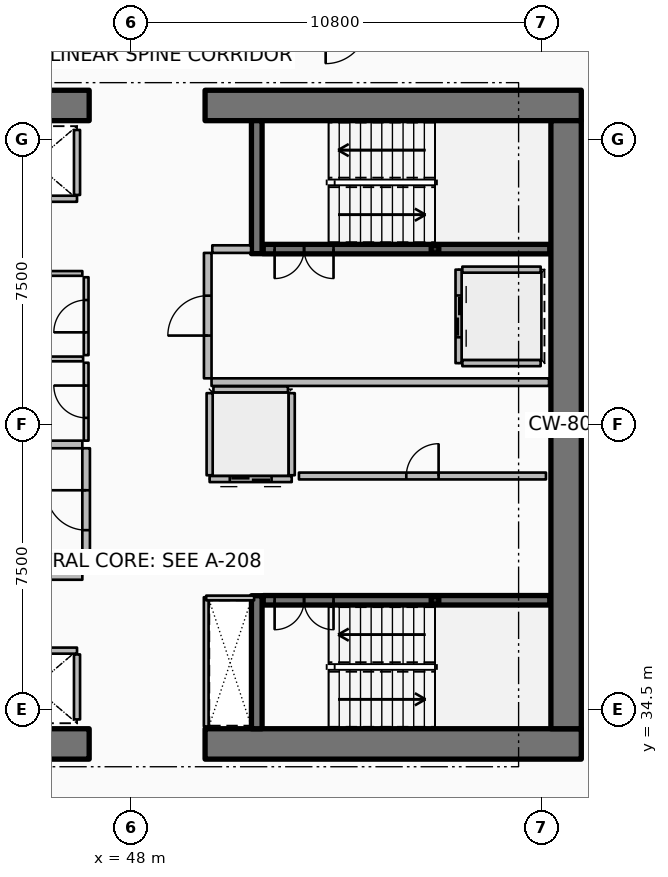
"""IFC4 building model, lengths in metres.
Left out: names, types, materials, properties, quantities, classifications, styles, units other than length and angle.
Written with IfcOpenShell. Run it as: python <this file> out.ifc"""

import sys

from ifc_helpers import new_model, si_unit, direction, frame, frame_2d, origin, origin_2d, place, context, subcontext, project, spatial, rectangle, hollow_rectangle, extrude, element, fill, save


model = new_model("IFC4")
c1 = context("Model", 3, precision=1e-05, world=origin(), true_north=direction((0.0, 1.0)))
c2 = subcontext(c1, "Body", "Model", "MODEL_VIEW")
j1 = project(units=[si_unit("LENGTHUNIT", "METRE"), si_unit("PLANEANGLEUNIT", "RADIAN")], contexts=[c1])
p1 = place(None, origin())
s1 = spatial("IfcSite", under=j1, at=p1, CompositionType="ELEMENT")
p2 = place(p1, origin())
s2 = spatial("IfcBuilding", under=s1, at=p2, CompositionType="ELEMENT")
p3 = place(p2, frame((0.0, 0.0, 165.3)))
s3 = spatial("IfcBuildingStorey", under=s2, at=p3, CompositionType="ELEMENT", Elevation=165.3)
p4 = place(p3, frame((37.0, 33.6, 0.0), z_axis=(0.0, 0.0, 1.0), x_axis=(1.0, 0.0, 0.0)))
e1 = element("IfcWall", 1, at=p4, inside=s3, PredefinedType="SHEAR", context=c2, shape_type="SweptSolid", body=[
    extrude(rectangle(XDim=9.9, YDim=0.8, at=frame_2d((4.95, 0.0))), origin(), (0.0, 0.0, 1.0), 3.75),
])
p5 = place(p3, frame((49.95, 33.6, 0.0), z_axis=(0.0, 0.0, 1.0), x_axis=(1.0, 0.0, 0.0)))
e2 = element("IfcWall", 2, at=p5, inside=s3, PredefinedType="SHEAR", context=c2, shape_type="SweptSolid", body=[
    extrude(rectangle(XDim=9.9, YDim=0.8, at=frame_2d((4.95, 0.0))), origin(), (0.0, 0.0, 1.0), 3.75),
])
p6 = place(p3, frame((37.0, 50.4, 0.0), z_axis=(0.0, 0.0, 1.0), x_axis=(1.0, 0.0, 0.0)))
e3 = element("IfcWall", 3, at=p6, inside=s3, PredefinedType="SHEAR", context=c2, shape_type="SweptSolid", body=[
    extrude(rectangle(XDim=9.9, YDim=0.8, at=frame_2d((4.95, 0.0))), origin(), (0.0, 0.0, 1.0), 3.75),
])
p7 = place(p3, frame((49.95, 50.4, 0.0), z_axis=(0.0, 0.0, 1.0), x_axis=(1.0, 0.0, 0.0)))
e4 = element("IfcWall", 4, at=p7, inside=s3, PredefinedType="SHEAR", context=c2, shape_type="SweptSolid", body=[
    extrude(rectangle(XDim=9.9, YDim=0.8, at=frame_2d((4.95, 0.0))), origin(), (0.0, 0.0, 1.0), 3.75),
])
p8 = place(p3, frame((59.45, 34.0, 0.0), z_axis=(0.0, 0.0, 1.0), x_axis=(0.0, 1.0, 0.0)))
e5 = element("IfcWall", 5, at=p8, inside=s3, PredefinedType="SHEAR", context=c2, shape_type="SweptSolid", body=[
    extrude(rectangle(XDim=16.0, YDim=0.8, at=frame_2d((8.0, 0.0))), origin(), (0.0, 0.0, 1.0), 3.75),
])
for number, where, z_axis, x_axis in (
    (6, (51.31, 46.5, 0.0), (0.0, 0.0, 1.0), (0.0, 1.0, 0.0)),
    (7, (51.31, 34.0, 0.0), (0.0, 0.0, 1.0), (0.0, 1.0, 0.0)),
):
    element("IfcWall", number, at=place(p3, frame(where, z_axis=z_axis, x_axis=x_axis)), inside=s3, PredefinedType="SHEAR", context=c2, shape_type="SweptSolid", body=[
        extrude(rectangle(XDim=3.5, YDim=0.28, at=frame_2d((1.75, 0.0))), origin(), (0.0, 0.0, 1.0), 3.75),
    ])
for number, where, z_axis, x_axis in (
    (8, (56.0, 46.62, 0.0), (0.0, 0.0, 1.0), (1.0, 0.0, 0.0)),
    (9, (56.0, 37.38, 0.0), (0.0, 0.0, 1.0), (1.0, 0.0, 0.0)),
):
    element("IfcColumn", number, at=place(p3, frame(where, z_axis=z_axis, x_axis=x_axis)), inside=s3, PredefinedType="COLUMN", context=c2, shape_type="SweptSolid", body=[
        extrude(hollow_rectangle(XDim=0.2, YDim=0.2, WallThickness=0.01, InnerFilletRadius=0.01, OuterFilletRadius=0.02, at=origin_2d()), origin(), (0.0, 0.0, 1.0), 1.67),
    ])
p9 = place(p3, frame((51.48, 46.62, 0.0), z_axis=(0.0, 0.0, 1.0), x_axis=(1.0, 0.0, 0.0)))
e10 = element("IfcWall", 10, at=p9, inside=s3, PredefinedType="SOLIDWALL", context=c2, shape_type="SweptSolid", body=[
    extrude(rectangle(XDim=7.54, YDim=0.25, at=frame_2d((3.77, 0.0))), origin(), (0.0, 0.0, 1.0), 3.5),
])
p10 = place(p9, frame((0.3, 0.0, 0.0)))
e11 = element("IfcOpeningElement", 11, at=p10, cuts=e10, PredefinedType="OPENING", context=c2, shape_type="SweptSolid", body=[
    extrude(rectangle(XDim=1.55, YDim=2.15, at=frame_2d((0.775, 1.075))), frame((0.0, 0.135, 0.0), z_axis=(0.0, -1.0, 0.0), x_axis=(1.0, 0.0, 0.0)), (0.0, 0.0, 1.0), 0.27),
])
p11 = place(p3, frame((51.48, 37.38, 0.0), z_axis=(0.0, 0.0, 1.0), x_axis=(1.0, 0.0, 0.0)))
e12 = element("IfcWall", 12, at=p11, inside=s3, PredefinedType="SOLIDWALL", context=c2, shape_type="SweptSolid", body=[
    extrude(rectangle(XDim=7.54, YDim=0.25, at=frame_2d((3.77, 0.0))), origin(), (0.0, 0.0, 1.0), 3.5),
])
p12 = place(p11, frame((0.3, 0.0, 0.0)))
e13 = element("IfcOpeningElement", 13, at=p12, cuts=e12, PredefinedType="OPENING", context=c2, shape_type="SweptSolid", body=[
    extrude(rectangle(XDim=1.55, YDim=2.15, at=frame_2d((0.775, 1.075))), frame((0.0, 0.135, 0.0), z_axis=(0.0, -1.0, 0.0), x_axis=(1.0, 0.0, 0.0)), (0.0, 0.0, 1.0), 0.27),
])
p13 = place(p3, frame((46.58, 47.945, 0.0), z_axis=(0.0, 0.0, 1.0), x_axis=(-1.0, 0.0, 0.0)))
e14 = element("IfcWall", 14, at=p13, inside=s3, PredefinedType="PARTITIONING", context=c2, shape_type="SweptSolid", body=[
    extrude(rectangle(XDim=2.26, YDim=0.16, at=frame_2d((1.13, 0.0))), origin(), (0.0, 0.0, 1.0), 3.5),
])
p14 = place(p3, frame((46.58, 48.045, 0.0), z_axis=(0.0, 0.0, 1.0), x_axis=(0.0, 1.0, 0.0)))
e15 = element("IfcWall", 15, at=p14, inside=s3, PredefinedType="PARTITIONING", context=c2, shape_type="SweptSolid", body=[
    extrude(rectangle(XDim=1.71, YDim=0.16, at=frame_2d((0.855, 0.0))), origin(), (0.0, 0.0, 1.0), 3.5),
])
p15 = place(p3, frame((44.32, 36.055, 0.0), z_axis=(0.0, 0.0, 1.0), x_axis=(1.0, 0.0, 0.0)))
e16 = element("IfcWall", 16, at=p15, inside=s3, PredefinedType="PARTITIONING", context=c2, shape_type="SweptSolid", body=[
    extrude(rectangle(XDim=2.26, YDim=0.16, at=frame_2d((1.13, 0.0))), origin(), (0.0, 0.0, 1.0), 3.5),
])
p16 = place(p3, frame((46.58, 34.245, 0.0), z_axis=(0.0, 0.0, 1.0), x_axis=(0.0, 1.0, 0.0)))
e17 = element("IfcWall", 17, at=p16, inside=s3, PredefinedType="PARTITIONING", context=c2, shape_type="SweptSolid", body=[
    extrude(rectangle(XDim=1.71, YDim=0.16, at=frame_2d((0.855, 0.0))), origin(), (0.0, 0.0, 1.0), 3.5),
])
p17 = place(p3, frame((56.62, 46.08, 0.0), z_axis=(0.0, 0.0, 1.0), x_axis=(0.0, -1.0, 0.0)))
e18 = element("IfcWall", 18, at=p17, inside=s3, PredefinedType="PARTITIONING", context=c2, shape_type="SweptSolid", body=[
    extrude(rectangle(XDim=2.46, YDim=0.16, at=frame_2d((1.23, 0.0))), origin(), (0.0, 0.0, 1.0), 3.5),
])
p18 = place(p17, frame((0.68, 0.0, 0.0)))
e19 = element("IfcOpeningElement", 19, at=p18, cuts=e18, PredefinedType="OPENING", context=c2, shape_type="SweptSolid", body=[
    extrude(rectangle(XDim=1.1, YDim=2.1, at=frame_2d((0.55, 1.05))), frame((0.0, 0.09, 0.0), z_axis=(0.0, -1.0, 0.0), x_axis=(1.0, 0.0, 0.0)), (0.0, 0.0, 1.0), 0.18),
])
for number, where, z_axis, x_axis in (
    (20, (56.72, 46.08, 0.0), (0.0, 0.0, 1.0), (1.0, 0.0, 0.0)),
    (21, (56.72, 43.62, 0.0), (0.0, 0.0, 1.0), (1.0, 0.0, 0.0)),
):
    element("IfcWall", number, at=place(p3, frame(where, z_axis=z_axis, x_axis=x_axis)), inside=s3, PredefinedType="PARTITIONING", context=c2, shape_type="SweptSolid", body=[
        extrude(rectangle(XDim=2.06, YDim=0.16, at=frame_2d((1.03, 0.0))), origin(), (0.0, 0.0, 1.0), 3.5),
    ])
p19 = place(p3, frame((52.23, 40.57, 0.0), z_axis=(0.0, 0.0, 1.0), x_axis=(-1.0, 0.0, 0.0)))
e22 = element("IfcWall", 22, at=p19, inside=s3, PredefinedType="PARTITIONING", context=c2, shape_type="SweptSolid", body=[
    extrude(rectangle(XDim=2.16, YDim=0.16, at=frame_2d((1.08, 0.0))), origin(), (0.0, 0.0, 1.0), 3.5),
])
p20 = place(p19, frame((0.53, 0.0, 0.0)))
e23 = element("IfcOpeningElement", 23, at=p20, cuts=e22, PredefinedType="OPENING", context=c2, shape_type="SweptSolid", body=[
    extrude(rectangle(XDim=1.1, YDim=2.1, at=frame_2d((0.55, 1.05))), frame((0.0, 0.09, 0.0), z_axis=(0.0, -1.0, 0.0), x_axis=(1.0, 0.0, 0.0)), (0.0, 0.0, 1.0), 0.18),
])
for number, where, z_axis, x_axis in (
    (24, (52.23, 40.67, 0.0), (0.0, 0.0, 1.0), (0.0, 1.0, 0.0)),
    (25, (50.07, 40.67, 0.0), (0.0, 0.0, 1.0), (0.0, 1.0, 0.0)),
):
    element("IfcWall", number, at=place(p3, frame(where, z_axis=z_axis, x_axis=x_axis)), inside=s3, PredefinedType="PARTITIONING", context=c2, shape_type="SweptSolid", body=[
        extrude(rectangle(XDim=2.16, YDim=0.16, at=frame_2d((1.08, 0.0))), origin(), (0.0, 0.0, 1.0), 3.5),
    ])
p21 = place(p3, frame((50.17, 42.93, 0.0), z_axis=(0.0, 0.0, 1.0), x_axis=(1.0, 0.0, 0.0)))
e26 = element("IfcWall", 26, at=p21, inside=s3, PredefinedType="PARTITIONING", context=c2, shape_type="SweptSolid", body=[
    extrude(rectangle(XDim=1.96, YDim=0.16, at=frame_2d((0.98, 0.0))), origin(), (0.0, 0.0, 1.0), 3.5),
])
p22 = place(p3, frame((52.42, 40.65, 0.0), z_axis=(0.0, 0.0, 1.0), x_axis=(1.0, 0.0, 0.0)))
e27 = element("IfcWall", 27, at=p22, inside=s3, PredefinedType="PARTITIONING", context=c2, shape_type="SweptSolid", body=[
    extrude(rectangle(XDim=6.5, YDim=0.18, at=frame_2d((3.25, 0.0))), origin(), (0.0, 0.0, 1.0), 3.5),
])
p23 = place(p22, frame((2.825, 0.0, 0.0)))
e28 = element("IfcOpeningElement", 28, at=p23, cuts=e27, PredefinedType="OPENING", context=c2, shape_type="SweptSolid", body=[
    extrude(rectangle(XDim=0.85, YDim=2.06, at=frame_2d((0.425, 1.03))), frame((0.0, 0.1, 0.0), z_axis=(0.0, -1.0, 0.0), x_axis=(1.0, 0.0, 0.0)), (0.0, 0.0, 1.0), 0.2),
])
p24 = place(p3, frame((41.35, 38.02, 0.0), z_axis=(0.0, 0.0, 1.0), x_axis=(1.0, 0.0, 0.0)))
e29 = element("IfcWall", 29, at=p24, inside=s3, PredefinedType="PARTITIONING", context=c2, shape_type="SweptSolid", body=[
    extrude(rectangle(XDim=5.37, YDim=0.2, at=frame_2d((2.685, 0.0))), origin(), (0.0, 0.0, 1.0), 3.5),
])
p25 = place(p3, frame((43.92, 41.48, 0.0), z_axis=(0.0, 0.0, 1.0), x_axis=(1.0, 0.0, 0.0)))
e30 = element("IfcWall", 30, at=p25, inside=s3, PredefinedType="PARTITIONING", context=c2, shape_type="SweptSolid", body=[
    extrude(rectangle(XDim=2.8, YDim=0.2, at=frame_2d((1.4, 0.0))), origin(), (0.0, 0.0, 1.0), 3.5),
])
p26 = place(p3, frame((46.82, 38.12, 0.0), z_axis=(0.0, 0.0, 1.0), x_axis=(0.0, 1.0, 0.0)))
e31 = element("IfcWall", 31, at=p26, inside=s3, PredefinedType="PARTITIONING", context=c2, shape_type="SweptSolid", body=[
    extrude(rectangle(XDim=3.26, YDim=0.2, at=frame_2d((1.63, 0.0))), origin(), (0.0, 0.0, 1.0), 3.5),
])
p27 = place(p26, frame((1.105, 0.0, 0.0)))
e32 = element("IfcOpeningElement", 32, at=p27, cuts=e31, PredefinedType="OPENING", context=c2, shape_type="SweptSolid", body=[
    extrude(rectangle(XDim=1.05, YDim=2.1, at=frame_2d((0.525, 1.05))), frame((0.0, 0.11, 0.0), z_axis=(0.0, -1.0, 0.0), x_axis=(1.0, 0.0, 0.0)), (0.0, 0.0, 1.0), 0.22),
])
p28 = place(p3, frame((50.12, 43.12, 0.0), z_axis=(0.0, 0.0, 1.0), x_axis=(1.0, 0.0, 0.0)))
e33 = element("IfcWall", 33, at=p28, inside=s3, PredefinedType="PARTITIONING", context=c2, shape_type="SweptSolid", body=[
    extrude(rectangle(XDim=8.88, YDim=0.2, at=frame_2d((4.44, 0.0))), origin(), (0.0, 0.0, 1.0), 3.5),
])
p29 = place(p3, frame((50.14, 46.62, 0.0), z_axis=(0.0, 0.0, 1.0), x_axis=(1.0, 0.0, 0.0)))
e34 = element("IfcWall", 34, at=p29, inside=s3, PredefinedType="PARTITIONING", context=c2, shape_type="SweptSolid", body=[
    extrude(rectangle(XDim=1.02, YDim=0.2, at=frame_2d((0.51, 0.0))), origin(), (0.0, 0.0, 1.0), 3.5),
])
p30 = place(p3, frame((50.02, 43.22, 0.0), z_axis=(0.0, 0.0, 1.0), x_axis=(0.0, 1.0, 0.0)))
e35 = element("IfcWall", 35, at=p30, inside=s3, PredefinedType="PARTITIONING", context=c2, shape_type="SweptSolid", body=[
    extrude(rectangle(XDim=3.3, YDim=0.2, at=frame_2d((1.65, 0.0))), origin(), (0.0, 0.0, 1.0), 3.5),
])
p31 = place(p30, frame((1.125, 0.0, 0.0)))
e36 = element("IfcOpeningElement", 36, at=p31, cuts=e35, PredefinedType="OPENING", context=c2, shape_type="SweptSolid", body=[
    extrude(rectangle(XDim=1.05, YDim=2.1, at=frame_2d((0.525, 1.05))), frame((0.0, 0.11, 0.0), z_axis=(0.0, -1.0, 0.0), x_axis=(1.0, 0.0, 0.0)), (0.0, 0.0, 1.0), 0.22),
])
p32 = place(p3, frame((41.36, 45.98, 0.0), z_axis=(0.0, 0.0, 1.0), x_axis=(1.0, 0.0, 0.0)))
e37 = element("IfcWall", 37, at=p32, inside=s3, PredefinedType="PARTITIONING", context=c2, shape_type="SweptSolid", body=[
    extrude(rectangle(XDim=5.36, YDim=0.125, at=frame_2d((2.68, 0.0))), origin(), (0.0, 0.0, 1.0), 2.94),
])
p33 = place(p3, frame((49.98, 34.06, 0.0), z_axis=(0.0, 0.0, 1.0), x_axis=(0.0, 1.0, 0.0)))
e38 = element("IfcWall", 38, at=p33, inside=s3, PredefinedType="PARTITIONING", context=c2, shape_type="SweptSolid", body=[
    extrude(rectangle(XDim=3.4, YDim=0.125, at=frame_2d((1.7, 0.0))), origin(), (0.0, 0.0, 1.0), 2.94),
])
p34 = place(p3, frame((49.98, 37.44, 0.0), z_axis=(0.0, 0.0, 1.0), x_axis=(1.0, 0.0, 0.0)))
e39 = element("IfcWall", 39, at=p34, inside=s3, PredefinedType="PARTITIONING", context=c2, shape_type="SweptSolid", body=[
    extrude(rectangle(XDim=1.26, YDim=0.125, at=frame_2d((0.63, 0.0))), origin(), (0.0, 0.0, 1.0), 2.94),
])
p35 = place(p3, frame((44.03, 43.73, 0.0), z_axis=(0.0, 0.0, 1.0), x_axis=(1.0, 0.0, 0.0)))
e40 = element("IfcWall", 40, at=p35, inside=s3, PredefinedType="PARTITIONING", context=c2, shape_type="SweptSolid", body=[
    extrude(rectangle(XDim=2.71, YDim=0.125, at=frame_2d((1.355, 0.0))), origin(), (0.0, 0.0, 1.0), 2.94),
])
p36 = place(p3, frame((46.82, 41.58, 0.0), z_axis=(0.0, 0.0, 1.0), x_axis=(0.0, 1.0, 0.0)))
e41 = element("IfcWall", 41, at=p36, inside=s3, PredefinedType="PARTITIONING", context=c2, shape_type="SweptSolid", body=[
    extrude(rectangle(XDim=2.05, YDim=0.125, at=frame_2d((1.025, 0.0))), origin(), (0.0, 0.0, 1.0), 2.94),
])
p37 = place(p36, frame((0.6, 0.0, 0.0)))
e42 = element("IfcOpeningElement", 42, at=p37, cuts=e41, PredefinedType="OPENING", context=c2, shape_type="SweptSolid", body=[
    extrude(rectangle(XDim=0.85, YDim=2.06, at=frame_2d((0.425, 1.03))), frame((0.0, 0.073, 0.0), z_axis=(0.0, -1.0, 0.0), x_axis=(1.0, 0.0, 0.0)), (0.0, 0.0, 1.0), 0.145),
])
p38 = place(p3, frame((46.82, 43.83, 0.0), z_axis=(0.0, 0.0, 1.0), x_axis=(0.0, 1.0, 0.0)))
e43 = element("IfcWall", 43, at=p38, inside=s3, PredefinedType="PARTITIONING", context=c2, shape_type="SweptSolid", body=[
    extrude(rectangle(XDim=2.05, YDim=0.125, at=frame_2d((1.025, 0.0))), origin(), (0.0, 0.0, 1.0), 2.94),
])
p39 = place(p38, frame((0.6, 0.0, 0.0)))
e44 = element("IfcOpeningElement", 44, at=p39, cuts=e43, PredefinedType="OPENING", context=c2, shape_type="SweptSolid", body=[
    extrude(rectangle(XDim=0.85, YDim=2.06, at=frame_2d((0.425, 1.03))), frame((0.0, 0.073, 0.0), z_axis=(0.0, -1.0, 0.0), x_axis=(1.0, 0.0, 0.0)), (0.0, 0.0, 1.0), 0.145),
])
p40 = place(p3, frame((63.52, 50.815, 0.0), z_axis=(0.0, 0.0, 1.0), x_axis=(-0.649447526186, 0.760406411553, 0.0)))
e45 = element("IfcWall", 45, at=p40, inside=s3, PredefinedType="PARTITIONING", context=c2, shape_type="SweptSolid", body=[
    extrude(rectangle(XDim=6.753, YDim=0.125, at=frame_2d((3.376, 0.0))), origin(), (0.0, 0.0, 1.0), 2.94),
])
p41 = place(p40, frame((2.926, 0.0, 0.0)))
e46 = element("IfcOpeningElement", 46, at=p41, cuts=e45, PredefinedType="OPENING", context=c2, shape_type="SweptSolid", body=[
    extrude(rectangle(XDim=0.9, YDim=2.08, at=frame_2d((0.45, 1.04))), frame((0.0, 0.073, 0.0), z_axis=(0.0, -1.0, 0.0), x_axis=(1.0, 0.0, 0.0)), (0.0, 0.0, 1.0), 0.145),
])
p42 = place(p10, origin())
e47 = element("IfcDoor", 47, at=p42, inside=s3, OperationType="DOUBLE_DOOR_SINGLE_SWING", PredefinedType="DOOR", context=c2, shape_type="SweptSolid", body=[
    extrude(rectangle(XDim=1.55, YDim=2.15, at=frame_2d((0.775, 1.075))), frame((0.0, 0.025, 0.0), z_axis=(0.0, -1.0, 0.0), x_axis=(1.0, 0.0, 0.0)), (0.0, 0.0, 1.0), 0.05),
])
fill(e11, e47)
p43 = place(p12, origin())
e48 = element("IfcDoor", 48, at=p43, inside=s3, OperationType="DOUBLE_DOOR_SINGLE_SWING", PredefinedType="DOOR", context=c2, shape_type="SweptSolid", body=[
    extrude(rectangle(XDim=1.55, YDim=2.15, at=frame_2d((0.775, 1.075))), frame((0.0, 0.025, 0.0), z_axis=(0.0, -1.0, 0.0), x_axis=(1.0, 0.0, 0.0)), (0.0, 0.0, 1.0), 0.05),
])
fill(e13, e48)
p44 = place(p18, origin())
e49 = element("IfcDoor", 49, at=p44, inside=s3, OperationType="DOUBLE_DOOR_SLIDING", PredefinedType="DOOR", context=c2, shape_type="SweptSolid", body=[
    extrude(rectangle(XDim=1.1, YDim=2.1, at=frame_2d((0.55, 1.05))), frame((0.0, 0.025, 0.0), z_axis=(0.0, -1.0, 0.0), x_axis=(1.0, 0.0, 0.0)), (0.0, 0.0, 1.0), 0.05),
])
fill(e19, e49)
p45 = place(p20, origin())
e50 = element("IfcDoor", 50, at=p45, inside=s3, OperationType="DOUBLE_DOOR_SLIDING", PredefinedType="DOOR", context=c2, shape_type="SweptSolid", body=[
    extrude(rectangle(XDim=1.1, YDim=2.1, at=frame_2d((0.55, 1.05))), frame((0.0, 0.025, 0.0), z_axis=(0.0, -1.0, 0.0), x_axis=(1.0, 0.0, 0.0)), (0.0, 0.0, 1.0), 0.05),
])
fill(e23, e50)
p46 = place(p23, origin())
e51 = element("IfcDoor", 51, at=p46, inside=s3, OperationType="SINGLE_SWING_RIGHT", PredefinedType="DOOR", context=c2, shape_type="SweptSolid", body=[
    extrude(rectangle(XDim=0.85, YDim=2.06, at=frame_2d((0.425, 1.03))), frame((0.0, 0.025, 0.0), z_axis=(0.0, -1.0, 0.0), x_axis=(1.0, 0.0, 0.0)), (0.0, 0.0, 1.0), 0.05),
])
fill(e28, e51)
p47 = place(p27, origin())
e52 = element("IfcDoor", 52, at=p47, inside=s3, OperationType="SINGLE_SWING_RIGHT", PredefinedType="DOOR", context=c2, shape_type="SweptSolid", body=[
    extrude(rectangle(XDim=1.05, YDim=2.1, at=frame_2d((0.525, 1.05))), frame((0.0, 0.025, 0.0), z_axis=(0.0, -1.0, 0.0), x_axis=(1.0, 0.0, 0.0)), (0.0, 0.0, 1.0), 0.05),
])
fill(e32, e52)
p48 = place(p31, origin())
e53 = element("IfcDoor", 53, at=p48, inside=s3, OperationType="SINGLE_SWING_LEFT", PredefinedType="DOOR", context=c2, shape_type="SweptSolid", body=[
    extrude(rectangle(XDim=1.05, YDim=2.1, at=frame_2d((0.525, 1.05))), frame((0.0, 0.025, 0.0), z_axis=(0.0, -1.0, 0.0), x_axis=(1.0, 0.0, 0.0)), (0.0, 0.0, 1.0), 0.05),
])
fill(e36, e53)
p49 = place(p37, origin())
e54 = element("IfcDoor", 54, at=p49, inside=s3, OperationType="SINGLE_SWING_RIGHT", PredefinedType="DOOR", context=c2, shape_type="SweptSolid", body=[
    extrude(rectangle(XDim=0.85, YDim=2.06, at=frame_2d((0.425, 1.03))), frame((0.0, 0.025, 0.0), z_axis=(0.0, -1.0, 0.0), x_axis=(1.0, 0.0, 0.0)), (0.0, 0.0, 1.0), 0.05),
])
fill(e42, e54)
p50 = place(p39, origin())
e55 = element("IfcDoor", 55, at=p50, inside=s3, OperationType="SINGLE_SWING_LEFT", PredefinedType="DOOR", context=c2, shape_type="SweptSolid", body=[
    extrude(rectangle(XDim=0.85, YDim=2.06, at=frame_2d((0.425, 1.03))), frame((0.0, 0.025, 0.0), z_axis=(0.0, -1.0, 0.0), x_axis=(1.0, 0.0, 0.0)), (0.0, 0.0, 1.0), 0.05),
])
fill(e44, e55)
save(model, sys.argv[1])
